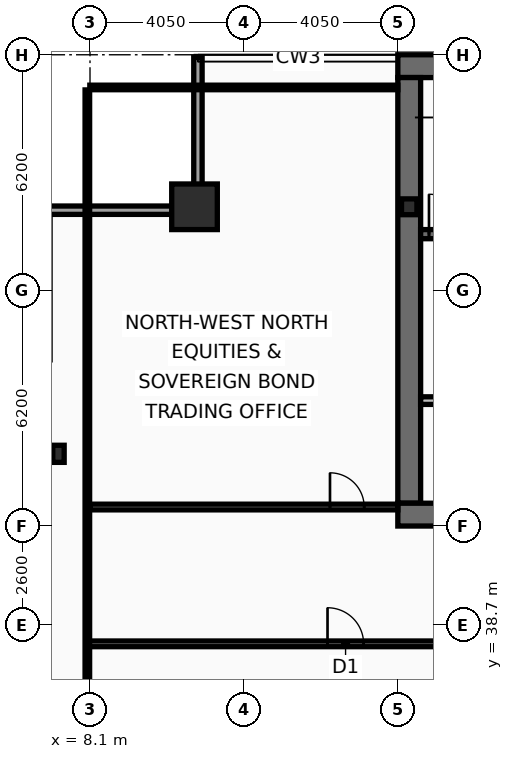
"""IFC4 building model, lengths in metres.
Left out: names, types, materials, properties, quantities, classifications, styles, units other than length and angle.
Written with IfcOpenShell. Run it as: python <this file> out.ifc"""

import sys

from ifc_helpers import new_model, si_unit, direction, frame, frame_2d, origin, origin_2d, place, context, subcontext, project, spatial, rectangle, hollow_rectangle, i_section, extrude, element, fill, save


model = new_model("IFC4")
c1 = context("Model", 3, precision=1e-05, world=origin(), true_north=direction((0.0, 1.0)))
c2 = subcontext(c1, "Body", "Model", "MODEL_VIEW")
j1 = project(units=[si_unit("LENGTHUNIT", "METRE"), si_unit("PLANEANGLEUNIT", "RADIAN")], contexts=[c1])
p1 = place(None, origin())
s1 = spatial("IfcSite", under=j1, at=p1, CompositionType="ELEMENT")
p2 = place(p1, origin())
s2 = spatial("IfcBuilding", under=s1, at=p2, CompositionType="ELEMENT")
p3 = place(p2, frame((0.0, 0.0, 224.6)))
s3 = spatial("IfcBuildingStorey", under=s2, at=p3, CompositionType="ELEMENT", Elevation=224.6)
p4 = place(p3, frame((16.2, 53.4, 0.0), z_axis=(0.0, 0.0, 1.0), x_axis=(1.0, 0.0, 0.0)))
e1 = element("IfcWall", 1, at=p4, inside=s3, PredefinedType="SHEAR", context=c2, shape_type="SweptSolid", body=[
    extrude(rectangle(XDim=40.5, YDim=0.6, at=frame_2d((20.25, 0.0))), origin(), (0.0, 0.0, 1.0), 3.44),
])
p5 = place(p3, frame((16.5, 41.9, 0.0), z_axis=(0.0, 0.0, 1.0), x_axis=(0.0, 1.0, 0.0)))
e2 = element("IfcWall", 2, at=p5, inside=s3, PredefinedType="SHEAR", context=c2, shape_type="SweptSolid", body=[
    extrude(rectangle(XDim=11.2, YDim=0.6, at=frame_2d((5.6, 0.0))), origin(), (0.0, 0.0, 1.0), 3.44),
])
p6 = place(p3, frame((18.65, 41.6, 0.0), z_axis=(0.0, 0.0, 1.0), x_axis=(-1.0, 0.0, 0.0)))
e3 = element("IfcWall", 3, at=p6, inside=s3, PredefinedType="SHEAR", context=c2, shape_type="SweptSolid", body=[
    extrude(rectangle(XDim=2.45, YDim=0.6, at=frame_2d((1.225, 0.0))), origin(), (0.0, 0.0, 1.0), 3.44),
])
p7 = place(p3, frame((16.8, 48.98, 0.0), z_axis=(0.0, 0.0, 1.0), x_axis=(1.0, 0.0, 0.0)))
e4 = element("IfcWall", 4, at=p7, inside=s3, PredefinedType="SHEAR", context=c2, shape_type="SweptSolid", body=[
    extrude(rectangle(XDim=7.42, YDim=0.24, at=frame_2d((3.71, 0.0))), origin(), (0.0, 0.0, 1.0), 3.44),
])
p8 = place(p7, frame((0.22, 0.0, 0.0)))
e5 = element("IfcOpeningElement", 5, at=p8, cuts=e4, PredefinedType="OPENING", context=c2, shape_type="SweptSolid", body=[
    extrude(rectangle(XDim=1.05, YDim=2.15, at=frame_2d((0.525, 1.075))), frame((0.0, 0.13, 0.0), z_axis=(0.0, -1.0, 0.0), x_axis=(1.0, 0.0, 0.0)), (0.0, 0.0, 1.0), 0.26),
])
p9 = place(p3, frame((10.85, 49.7, 0.0), z_axis=(0.0, 0.0, 1.0), x_axis=(1.0, 0.0, 0.0)))
e6 = element("IfcColumn", 6, at=p9, inside=s3, PredefinedType="COLUMN", context=c2, shape_type="SweptSolid", body=[
    extrude(hollow_rectangle(XDim=1.2, YDim=1.2, WallThickness=0.06, at=origin_2d()), origin(), (0.0, 0.0, 1.0), 3.6),
])
p10 = place(p3, frame((7.27, 43.2, 0.0), z_axis=(0.0, 0.0, 1.0), x_axis=(1.0, 0.0, 0.0)))
e7 = element("IfcColumn", 7, at=p10, inside=s3, PredefinedType="COLUMN", context=c2, shape_type="SweptSolid", body=[
    extrude(i_section(OverallWidth=0.3, OverallDepth=0.45, WebThickness=0.014, FlangeThickness=0.026, at=origin_2d()), origin(), (0.0, 0.0, 1.0), 3.6),
])
p11 = place(p3, frame((16.5, 49.7, 0.0), z_axis=(0.0, 0.0, 1.0), x_axis=(1.0, 0.0, 0.0)))
e8 = element("IfcColumn", 8, at=p11, inside=s3, PredefinedType="COLUMN", context=c2, shape_type="SweptSolid", body=[
    extrude(i_section(OverallWidth=0.406, OverallDepth=0.416, WebThickness=0.03, FlangeThickness=0.048, at=origin_2d()), origin(), (0.0, 0.0, 1.0), 3.6),
])
p12 = place(p3, frame((6.83, 49.61, 0.0), z_axis=(0.0, 0.0, 1.0), x_axis=(1.0, 0.0, 0.0)))
e9 = element("IfcWall", 9, at=p12, inside=s3, PredefinedType="SOLIDWALL", context=c2, shape_type="SweptSolid", body=[
    extrude(rectangle(XDim=4.22, YDim=0.22, at=frame_2d((2.11, 0.0))), origin(), (0.0, 0.0, 1.0), 2.83),
])
p13 = place(p3, frame((10.94, 49.72, 0.0), z_axis=(0.0, 0.0, 1.0), x_axis=(0.0, 1.0, 0.0)))
e10 = element("IfcWall", 10, at=p13, inside=s3, PredefinedType="SOLIDWALL", context=c2, shape_type="SweptSolid", body=[
    extrude(rectangle(XDim=3.91, YDim=0.22, at=frame_2d((1.955, 0.0))), origin(), (0.0, 0.0, 1.0), 2.83),
])
p14 = place(p3, frame((16.8, 44.6, 0.0), z_axis=(0.0, 0.0, 1.0), x_axis=(1.0, 0.0, 0.0)))
e11 = element("IfcWall", 11, at=p14, inside=s3, PredefinedType="PARTITIONING", context=c2, shape_type="SweptSolid", body=[
    extrude(rectangle(XDim=4.2, YDim=0.2, at=frame_2d((2.1, 0.0))), origin(), (0.0, 0.0, 1.0), 3.44),
])
p15 = place(p14, frame((1.25, 0.0, 0.0)))
e12 = element("IfcOpeningElement", 12, at=p15, cuts=e11, PredefinedType="OPENING", context=c2, shape_type="SweptSolid", body=[
    extrude(rectangle(XDim=1.05, YDim=2.15, at=frame_2d((0.525, 1.075))), frame((0.0, 0.11, 0.0), z_axis=(0.0, -1.0, 0.0), x_axis=(1.0, 0.0, 0.0)), (0.0, 0.0, 1.0), 0.22),
])
p16 = place(p3, frame((8.03, 38.2, 0.0), z_axis=(0.0, 0.0, 1.0), x_axis=(1.0, 0.0, 0.0)))
e13 = element("IfcWall", 13, at=p16, inside=s3, PredefinedType="PARTITIONING", context=c2, shape_type="SweptSolid", body=[
    extrude(rectangle(XDim=10.52, YDim=0.15, at=frame_2d((5.26, 0.0))), origin(), (0.0, 0.0, 1.0), 2.78),
])
p17 = place(p16, frame((6.32, 0.0, 0.0)))
e14 = element("IfcOpeningElement", 14, at=p17, cuts=e13, PredefinedType="OPENING", context=c2, shape_type="SweptSolid", body=[
    extrude(rectangle(XDim=0.95, YDim=2.05, at=frame_2d((0.475, 1.025))), frame((0.0, 0.085, 0.0), z_axis=(0.0, -1.0, 0.0), x_axis=(1.0, 0.0, 0.0)), (0.0, 0.0, 1.0), 0.17),
])
p18 = place(p3, frame((8.095, 41.8, 0.0), z_axis=(0.0, 0.0, 1.0), x_axis=(1.0, 0.0, 0.0)))
e15 = element("IfcWall", 15, at=p18, inside=s3, PredefinedType="PARTITIONING", context=c2, shape_type="SweptSolid", body=[
    extrude(rectangle(XDim=8.105, YDim=0.15, at=frame_2d((4.052, 0.0))), origin(), (0.0, 0.0, 1.0), 3.44),
])
p19 = place(p18, frame((6.32, 0.0, 0.0)))
e16 = element("IfcOpeningElement", 16, at=p19, cuts=e15, PredefinedType="OPENING", context=c2, shape_type="SweptSolid", body=[
    extrude(rectangle(XDim=0.9, YDim=2.05, at=frame_2d((0.45, 1.025))), frame((0.0, 0.085, 0.0), z_axis=(0.0, -1.0, 0.0), x_axis=(1.0, 0.0, 0.0)), (0.0, 0.0, 1.0), 0.17),
])
p20 = place(p3, frame((8.03, 10.665, 0.0), z_axis=(0.0, 0.0, 1.0), x_axis=(0.0, 1.0, 0.0)))
e17 = element("IfcWall", 17, at=p20, inside=s3, PredefinedType="PARTITIONING", context=c2, shape_type="SweptSolid", body=[
    extrude(rectangle(XDim=42.11, YDim=0.12, at=frame_2d((21.055, 0.0))), origin(), (0.0, 0.0, 1.0), 2.78),
])
p21 = place(p3, frame((8.095, 52.84, 0.0), z_axis=(0.0, 0.0, 1.0), x_axis=(1.0, 0.0, 0.0)))
e18 = element("IfcWall", 18, at=p21, inside=s3, PredefinedType="PARTITIONING", context=c2, shape_type="SweptSolid", body=[
    extrude(rectangle(XDim=8.105, YDim=0.12, at=frame_2d((4.052, 0.0))), origin(), (0.0, 0.0, 1.0), 3.44),
])
p22 = place(p8, origin())
e19 = element("IfcDoor", 19, at=p22, inside=s3, OperationType="SINGLE_SWING_LEFT", PredefinedType="DOOR", context=c2, shape_type="SweptSolid", body=[
    extrude(rectangle(XDim=1.05, YDim=2.15, at=frame_2d((0.525, 1.075))), frame((0.0, 0.025, 0.0), z_axis=(0.0, -1.0, 0.0), x_axis=(1.0, 0.0, 0.0)), (0.0, 0.0, 1.0), 0.05),
])
fill(e5, e19)
p23 = place(p17, origin())
e20 = element("IfcDoor", 20, at=p23, inside=s3, OperationType="SINGLE_SWING_LEFT", PredefinedType="DOOR", context=c2, shape_type="SweptSolid", body=[
    extrude(rectangle(XDim=0.95, YDim=2.05, at=frame_2d((0.475, 1.025))), frame((0.0, 0.025, 0.0), z_axis=(0.0, -1.0, 0.0), x_axis=(1.0, 0.0, 0.0)), (0.0, 0.0, 1.0), 0.05),
])
fill(e14, e20)
p24 = place(p19, origin())
e21 = element("IfcDoor", 21, at=p24, inside=s3, OperationType="SINGLE_SWING_LEFT", PredefinedType="DOOR", context=c2, shape_type="SweptSolid", body=[
    extrude(rectangle(XDim=0.9, YDim=2.05, at=frame_2d((0.45, 1.025))), frame((0.0, 0.025, 0.0), z_axis=(0.0, -1.0, 0.0), x_axis=(1.0, 0.0, 0.0)), (0.0, 0.0, 1.0), 0.05),
])
fill(e16, e21)
save(model, sys.argv[1])
